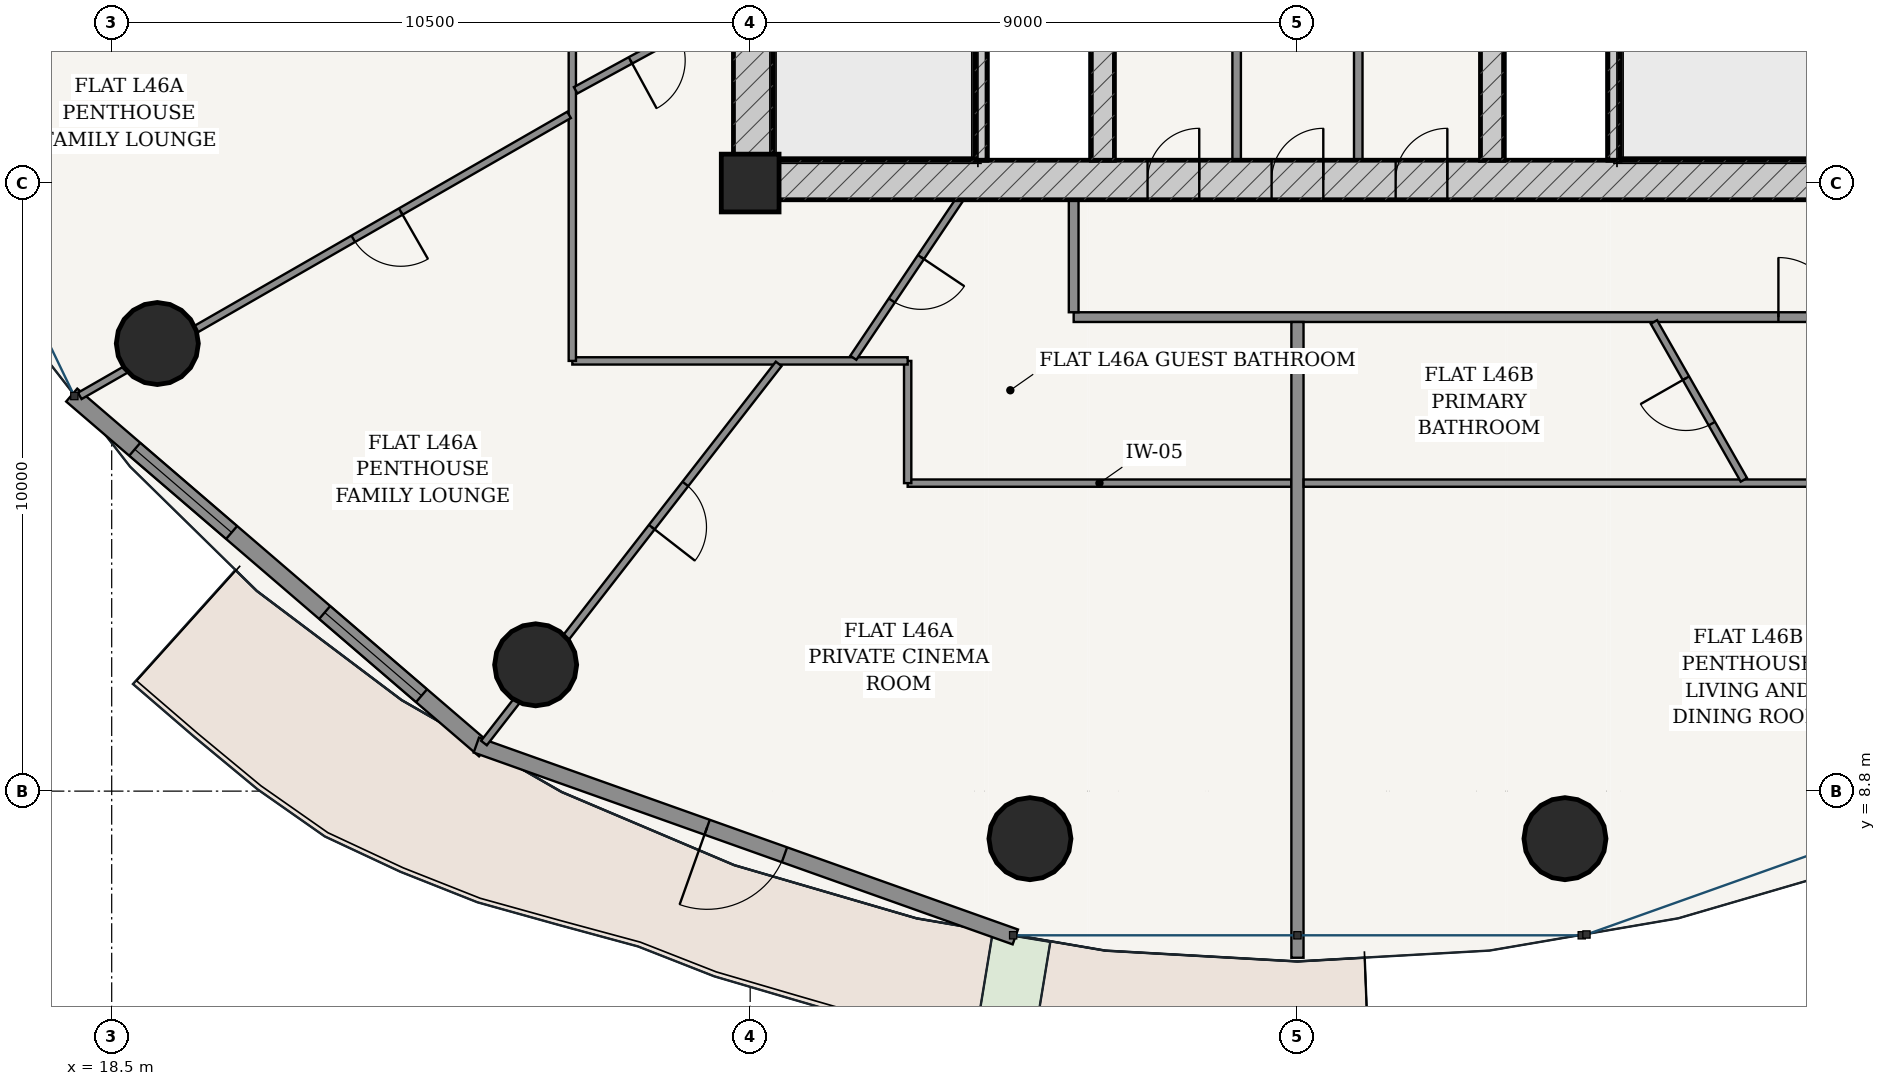
"""IFC4 building model, lengths in metres.
Left out: names, types, materials, properties, quantities, classifications, styles, units other than length and angle.
Written with IfcOpenShell. Run it as: python <this file> out.ifc"""

import sys

from ifc_helpers import new_model, si_unit, direction, frame, frame_2d, origin, origin_2d, place, context, subcontext, project, spatial, rectangle, hollow_circle, extrude, source, transform, mapped, element, fill, save


model = new_model("IFC4")
c1 = context("Model", 3, precision=1e-05, world=origin(), true_north=direction((-0.2419218956, 0.970295726276)))
c2 = subcontext(c1, "Body", "Model", "MODEL_VIEW")
j1 = project(units=[si_unit("LENGTHUNIT", "METRE"), si_unit("PLANEANGLEUNIT", "RADIAN")], contexts=[c1])
p1 = place(None, origin())
s1 = spatial("IfcSite", under=j1, at=p1, CompositionType="ELEMENT")
p2 = place(p1, origin())
s2 = spatial("IfcBuilding", under=s1, at=p2, CompositionType="ELEMENT")
p3 = place(p2, frame((0.0, 0.0, 175.0)))
s3 = spatial("IfcBuildingStorey", under=s2, at=p3, CompositionType="ELEMENT", Elevation=175.0)
p4 = place(p3, frame((29.0, 18.8, 0.0), z_axis=(0.0, 0.0, 1.0), x_axis=(1.0, 0.0, 0.0)))
e1 = element("IfcColumn", 1, at=p4, inside=s3, PredefinedType="COLUMN", context=c2, shape_type="SweptSolid", body=[
    extrude(rectangle(XDim=0.95, YDim=0.95, at=origin_2d()), origin(), (0.0, 0.0, 1.0), 3.6),
])
p5 = place(p3, frame((28.725, 18.85, 0.0), z_axis=(0.0, 0.0, 1.0), x_axis=(1.0, 0.0, 0.0)))
e2 = element("IfcWall", 2, at=p5, inside=s3, PredefinedType="SHEAR", context=c2, shape_type="SweptSolid", body=[
    extrude(rectangle(XDim=18.55, YDim=0.65, at=frame_2d((9.275, 0.0))), origin(), (0.0, 0.0, 1.0), 3.33),
])
p6 = place(p5, frame((6.81, 0.0, 0.0)))
e3 = element("IfcOpeningElement", 3, at=p6, cuts=e2, PredefinedType="OPENING", context=c2, shape_type="SweptSolid", body=[
    extrude(rectangle(XDim=0.85, YDim=2.1, at=frame_2d((0.425, 1.05))), frame((0.0, 0.335, 0.0), z_axis=(0.0, -1.0, 0.0), x_axis=(1.0, 0.0, 0.0)), (0.0, 0.0, 1.0), 0.67),
])
p7 = place(p5, frame((8.85, 0.0, 0.0)))
e4 = element("IfcOpeningElement", 4, at=p7, cuts=e2, PredefinedType="OPENING", context=c2, shape_type="SweptSolid", body=[
    extrude(rectangle(XDim=0.85, YDim=2.1, at=frame_2d((0.425, 1.05))), frame((0.0, 0.335, 0.0), z_axis=(0.0, -1.0, 0.0), x_axis=(1.0, 0.0, 0.0)), (0.0, 0.0, 1.0), 0.67),
])
p8 = place(p5, frame((10.89, 0.0, 0.0)))
e5 = element("IfcOpeningElement", 5, at=p8, cuts=e2, PredefinedType="OPENING", context=c2, shape_type="SweptSolid", body=[
    extrude(rectangle(XDim=0.85, YDim=2.1, at=frame_2d((0.425, 1.05))), frame((0.0, 0.335, 0.0), z_axis=(0.0, -1.0, 0.0), x_axis=(1.0, 0.0, 0.0)), (0.0, 0.0, 1.0), 0.67),
])
p9 = place(p3, frame((29.05, 19.175, 0.0), z_axis=(0.0, 0.0, 1.0), x_axis=(0.0, 1.0, 0.0)))
e6 = element("IfcWall", 6, at=p9, inside=s3, PredefinedType="SHEAR", context=c2, shape_type="SweptSolid", body=[
    extrude(rectangle(XDim=15.25, YDim=0.65, at=frame_2d((7.625, 0.0))), origin(), (0.0, 0.0, 1.0), 3.33),
])
p10 = place(p9, frame((9.875, 0.0, 0.0)))
e7 = element("IfcOpeningElement", 7, at=p10, cuts=e6, PredefinedType="OPENING", context=c2, shape_type="SweptSolid", body=[
    extrude(rectangle(XDim=1.5, YDim=2.2, at=frame_2d((0.75, 1.1))), frame((0.0, 0.335, 0.0), z_axis=(0.0, -1.0, 0.0), x_axis=(1.0, 0.0, 0.0)), (0.0, 0.0, 1.0), 0.67),
])
for number, where, z_axis, x_axis in (
    (8, (32.795, 19.175, 0.0), (0.0, 0.0, 1.0), (0.0, 1.0, 0.0)),
    (9, (43.205, 19.175, 0.0), (0.0, 0.0, 1.0), (0.0, 1.0, 0.0)),
):
    element("IfcWall", number, at=place(p3, frame(where, z_axis=z_axis, x_axis=x_axis)), inside=s3, PredefinedType="SOLIDWALL", context=c2, shape_type="SweptSolid", body=[
        extrude(rectangle(XDim=7.375, YDim=0.2, at=frame_2d((3.688, 0.0))), origin(), (0.0, 0.0, 1.0), 3.33),
    ])
p11 = place(p3, frame((34.8, 19.175, 0.0), z_axis=(0.0, 0.0, 1.0), x_axis=(0.0, 1.0, 0.0)))
e10 = element("IfcWall", 10, at=p11, inside=s3, PredefinedType="SHEAR", context=c2, shape_type="SweptSolid", body=[
    extrude(rectangle(XDim=15.25, YDim=0.38, at=frame_2d((7.625, 0.0))), origin(), (0.0, 0.0, 1.0), 3.33),
])
p12 = place(p11, frame((7.8, 0.0, 0.0)))
e11 = element("IfcOpeningElement", 11, at=p12, cuts=e10, PredefinedType="OPENING", context=c2, shape_type="SweptSolid", body=[
    extrude(rectangle(XDim=1.05, YDim=2.15, at=frame_2d((0.525, 1.075))), frame((0.0, 0.2, 0.0), z_axis=(0.0, -1.0, 0.0), x_axis=(1.0, 0.0, 0.0)), (0.0, 0.0, 1.0), 0.4),
])
p13 = place(p3, frame((41.2, 19.175, 0.0), z_axis=(0.0, 0.0, 1.0), x_axis=(0.0, 1.0, 0.0)))
e12 = element("IfcWall", 12, at=p13, inside=s3, PredefinedType="SHEAR", context=c2, shape_type="SweptSolid", body=[
    extrude(rectangle(XDim=15.25, YDim=0.38, at=frame_2d((7.625, 0.0))), origin(), (0.0, 0.0, 1.0), 3.33),
])
p14 = place(p13, frame((7.8, 0.0, 0.0)))
e13 = element("IfcOpeningElement", 13, at=p14, cuts=e12, PredefinedType="OPENING", context=c2, shape_type="SweptSolid", body=[
    extrude(rectangle(XDim=1.05, YDim=2.15, at=frame_2d((0.525, 1.075))), frame((0.0, 0.2, 0.0), z_axis=(0.0, -1.0, 0.0), x_axis=(1.0, 0.0, 0.0)), (0.0, 0.0, 1.0), 0.4),
])
for number, where, z_axis, x_axis in (
    (14, (19.25, 16.161, 0.0), (0.0, 0.0, 1.0), (1.0, 0.0, 0.0)),
    (15, (25.472, 10.877, 0.0), (0.0, 0.0, 1.0), (1.0, 0.0, 0.0)),
    (16, (33.601, 8.018, 0.0), (0.0, 0.0, 1.0), (1.0, 0.0, 0.0)),
    (17, (42.399, 8.018, 0.0), (0.0, 0.0, 1.0), (1.0, 0.0, 0.0)),
):
    element("IfcColumn", number, at=place(p3, frame(where, z_axis=z_axis, x_axis=x_axis)), inside=s3, PredefinedType="COLUMN", context=c2, shape_type="SweptSolid", body=[
        extrude(hollow_circle(Radius=0.675, WallThickness=0.042, at=origin_2d()), origin(), (0.0, 0.0, 1.0), 3.6),
    ])
p15 = place(p3, frame((17.843, 15.313, 0.0), z_axis=(0.0, 0.0, 1.0), x_axis=(0.75843401647, -0.651749831348, 0.0)))
e18 = element("IfcWall", 18, at=p15, inside=s3, PredefinedType="SOLIDWALL", context=c2, shape_type="SweptSolid", body=[
    extrude(rectangle(XDim=8.952, YDim=0.28, at=frame_2d((4.476, 0.0))), origin(), (0.0, 0.0, 1.0), 3.33),
])
p16 = place(p15, frame((1.367, 0.0, 0.85)))
e19 = element("IfcOpeningElement", 19, at=p16, cuts=e18, PredefinedType="OPENING", context=c2, shape_type="SweptSolid", body=[
    extrude(rectangle(XDim=2.1, YDim=1.95, at=frame_2d((1.05, 0.975))), frame((0.0, 0.15, 0.0), z_axis=(0.0, -1.0, 0.0), x_axis=(1.0, 0.0, 0.0)), (0.0, 0.0, 1.0), 0.3),
])
p17 = place(p15, frame((5.485, 0.0, 0.85)))
e20 = element("IfcOpeningElement", 20, at=p17, cuts=e18, PredefinedType="OPENING", context=c2, shape_type="SweptSolid", body=[
    extrude(rectangle(XDim=2.1, YDim=1.95, at=frame_2d((1.05, 0.975))), frame((0.0, 0.15, 0.0), z_axis=(0.0, -1.0, 0.0), x_axis=(1.0, 0.0, 0.0)), (0.0, 0.0, 1.0), 0.3),
])
p18 = place(p3, frame((24.497, 9.557, 0.0), z_axis=(0.0, 0.0, 1.0), x_axis=(0.942103604331, -0.335321932934, 0.0)))
e21 = element("IfcWall", 21, at=p18, inside=s3, PredefinedType="SOLIDWALL", context=c2, shape_type="SweptSolid", body=[
    extrude(rectangle(XDim=9.408, YDim=0.26, at=frame_2d((4.704, 0.0))), origin(), (0.0, 0.0, 1.0), 3.33),
])
p19 = place(p18, frame((4.029, 0.0, 0.0)))
e22 = element("IfcOpeningElement", 22, at=p19, cuts=e21, PredefinedType="OPENING", context=c2, shape_type="SweptSolid", body=[
    extrude(rectangle(XDim=1.35, YDim=2.2, at=frame_2d((0.675, 1.1))), frame((0.0, 0.14, 0.0), z_axis=(0.0, -1.0, 0.0), x_axis=(1.0, 0.0, 0.0)), (0.0, 0.0, 1.0), 0.28),
])
p20 = place(p3, frame((37.0, 19.175, 0.0), z_axis=(0.0, 0.0, 1.0), x_axis=(0.0, 1.0, 0.0)))
e23 = element("IfcWall", 23, at=p20, inside=s3, PredefinedType="PARTITIONING", context=c2, shape_type="SweptSolid", body=[
    extrude(rectangle(XDim=4.465, YDim=0.14, at=frame_2d((2.232, 0.0))), origin(), (0.0, 0.0, 1.0), 3.33),
])
p21 = place(p20, frame((1.808, 0.0, 0.0)))
e24 = element("IfcOpeningElement", 24, at=p21, cuts=e23, PredefinedType="OPENING", context=c2, shape_type="SweptSolid", body=[
    extrude(rectangle(XDim=0.85, YDim=2.1, at=frame_2d((0.425, 1.05))), frame((0.0, 0.08, 0.0), z_axis=(0.0, -1.0, 0.0), x_axis=(1.0, 0.0, 0.0)), (0.0, 0.0, 1.0), 0.16),
])
p22 = place(p3, frame((39.0, 19.175, 0.0), z_axis=(0.0, 0.0, 1.0), x_axis=(0.0, 1.0, 0.0)))
e25 = element("IfcWall", 25, at=p22, inside=s3, PredefinedType="PARTITIONING", context=c2, shape_type="SweptSolid", body=[
    extrude(rectangle(XDim=4.465, YDim=0.14, at=frame_2d((2.232, 0.0))), origin(), (0.0, 0.0, 1.0), 3.33),
])
p23 = place(p22, frame((1.808, 0.0, 0.0)))
e26 = element("IfcOpeningElement", 26, at=p23, cuts=e25, PredefinedType="OPENING", context=c2, shape_type="SweptSolid", body=[
    extrude(rectangle(XDim=0.85, YDim=2.1, at=frame_2d((0.425, 1.05))), frame((0.0, 0.08, 0.0), z_axis=(0.0, -1.0, 0.0), x_axis=(1.0, 0.0, 0.0)), (0.0, 0.0, 1.0), 0.16),
])
p24 = place(p3, frame((34.32, 16.595, 0.0), z_axis=(0.0, 0.0, 1.0), x_axis=(1.0, 0.0, 0.0)))
e27 = element("IfcWall", 27, at=p24, inside=s3, PredefinedType="PARTITIONING", context=c2, shape_type="SweptSolid", body=[
    extrude(rectangle(XDim=14.885, YDim=0.16, at=frame_2d((7.442, 0.0))), origin(), (0.0, 0.0, 1.0), 2.776),
])
p25 = place(p24, frame((11.59, 0.0, 0.0)))
e28 = element("IfcOpeningElement", 28, at=p25, cuts=e27, PredefinedType="OPENING", context=c2, shape_type="SweptSolid", body=[
    extrude(rectangle(XDim=0.98, YDim=2.2, at=frame_2d((0.49, 1.1))), frame((0.0, 0.09, 0.0), z_axis=(0.0, -1.0, 0.0), x_axis=(1.0, 0.0, 0.0)), (0.0, 0.0, 1.0), 0.18),
])
p26 = place(p3, frame((34.32, 16.675, 0.0), z_axis=(0.0, 0.0, 1.0), x_axis=(0.0, 1.0, 0.0)))
e29 = element("IfcWall", 29, at=p26, inside=s3, PredefinedType="PARTITIONING", context=c2, shape_type="SweptSolid", body=[
    extrude(rectangle(XDim=1.85, YDim=0.16, at=frame_2d((0.925, 0.0))), origin(), (0.0, 0.0, 1.0), 3.33),
])
p27 = place(p3, frame((37.898, 13.865, 0.0), z_axis=(0.0, 0.0, 1.0), x_axis=(-1.0, 0.0, 0.0)))
e30 = element("IfcWall", 30, at=p27, inside=s3, PredefinedType="PARTITIONING", context=c2, shape_type="SweptSolid", body=[
    extrude(rectangle(XDim=6.308, YDim=0.12, at=frame_2d((3.154, 0.0))), origin(), (0.0, 0.0, 1.0), 2.776),
])
p28 = place(p3, frame((31.59, 13.865, 0.0), z_axis=(0.0, 0.0, 1.0), x_axis=(0.0, 1.0, 0.0)))
e31 = element("IfcWall", 31, at=p28, inside=s3, PredefinedType="PARTITIONING", context=c2, shape_type="SweptSolid", body=[
    extrude(rectangle(XDim=2.01, YDim=0.12, at=frame_2d((1.005, 0.0))), origin(), (0.0, 0.0, 1.0), 3.005),
])
p29 = place(p3, frame((31.59, 15.875, 0.0), z_axis=(0.0, 0.0, 1.0), x_axis=(-1.0, 0.0, 0.0)))
e32 = element("IfcWall", 32, at=p29, inside=s3, PredefinedType="PARTITIONING", context=c2, shape_type="SweptSolid", body=[
    extrude(rectangle(XDim=5.515, YDim=0.12, at=frame_2d((2.758, 0.0))), origin(), (0.0, 0.0, 1.0), 2.776),
])
p30 = place(p3, frame((26.075, 15.875, 0.0), z_axis=(0.0, 0.0, 1.0), x_axis=(0.0, 1.0, 0.0)))
e33 = element("IfcWall", 33, at=p30, inside=s3, PredefinedType="PARTITIONING", context=c2, shape_type="SweptSolid", body=[
    extrude(rectangle(XDim=5.715, YDim=0.12, at=frame_2d((2.857, 0.0))), origin(), (0.0, 0.0, 1.0), 2.776),
])
p31 = place(p3, frame((26.021, 19.921, 0.0), z_axis=(0.0, 0.0, 1.0), x_axis=(-0.867161148693, -0.498027652041, 0.0)))
e34 = element("IfcWall", 34, at=p31, inside=s3, PredefinedType="PARTITIONING", context=c2, shape_type="SweptSolid", body=[
    extrude(rectangle(XDim=9.279, YDim=0.12, at=frame_2d((4.64, 0.0))), origin(), (0.0, 0.0, 1.0), 2.776),
])
p32 = place(p31, frame((3.192, 0.0, 0.0)))
e35 = element("IfcOpeningElement", 35, at=p32, cuts=e34, PredefinedType="OPENING", context=c2, shape_type="SweptSolid", body=[
    extrude(rectangle(XDim=0.9, YDim=2.15, at=frame_2d((0.45, 1.075))), frame((0.0, 0.07, 0.0), z_axis=(0.0, -1.0, 0.0), x_axis=(1.0, 0.0, 0.0)), (0.0, 0.0, 1.0), 0.14),
])
p33 = place(p3, frame((29.469, 15.826, 0.0), z_axis=(0.0, 0.0, 1.0), x_axis=(-0.61373942367, -0.789508657225, 0.0)))
e36 = element("IfcWall", 36, at=p33, inside=s3, PredefinedType="PARTITIONING", context=c2, shape_type="SweptSolid", body=[
    extrude(rectangle(XDim=7.898, YDim=0.12, at=frame_2d((3.949, 0.0))), origin(), (0.0, 0.0, 1.0), 2.776),
])
p34 = place(p33, frame((2.5, 0.0, 0.0)))
e37 = element("IfcOpeningElement", 37, at=p34, cuts=e36, PredefinedType="OPENING", context=c2, shape_type="SweptSolid", body=[
    extrude(rectangle(XDim=0.9, YDim=2.15, at=frame_2d((0.45, 1.075))), frame((0.0, 0.07, 0.0), z_axis=(0.0, -1.0, 0.0), x_axis=(1.0, 0.0, 0.0)), (0.0, 0.0, 1.0), 0.14),
])
p35 = place(p3, frame((28.723, 21.74, 0.0), z_axis=(0.0, 0.0, 1.0), x_axis=(-0.877892414948, -0.47885792024, 0.0)))
e38 = element("IfcWall", 38, at=p35, inside=s3, PredefinedType="PARTITIONING", context=c2, shape_type="SweptSolid", body=[
    extrude(rectangle(XDim=2.955, YDim=0.12, at=frame_2d((1.477, 0.0))), origin(), (0.0, 0.0, 1.0), 3.33),
])
p36 = place(p35, frame((1.027, 0.0, 0.0)))
e39 = element("IfcOpeningElement", 39, at=p36, cuts=e38, PredefinedType="OPENING", context=c2, shape_type="SweptSolid", body=[
    extrude(rectangle(XDim=0.9, YDim=2.15, at=frame_2d((0.45, 1.075))), frame((0.0, 0.07, 0.0), z_axis=(0.0, -1.0, 0.0), x_axis=(1.0, 0.0, 0.0)), (0.0, 0.0, 1.0), 0.14),
])
p37 = place(p3, frame((32.441, 18.525, 0.0), z_axis=(0.0, 0.0, 1.0), x_axis=(-0.557594690071, -0.830113342625, 0.0)))
e40 = element("IfcWall", 40, at=p37, inside=s3, PredefinedType="PARTITIONING", context=c2, shape_type="SweptSolid", body=[
    extrude(rectangle(XDim=3.13, YDim=0.12, at=frame_2d((1.565, 0.0))), origin(), (0.0, 0.0, 1.0), 3.33),
])
p38 = place(p37, frame((1.135, 0.0, 0.0)))
e41 = element("IfcOpeningElement", 41, at=p38, cuts=e40, PredefinedType="OPENING", context=c2, shape_type="SweptSolid", body=[
    extrude(rectangle(XDim=0.86, YDim=2.15, at=frame_2d((0.43, 1.075))), frame((0.0, 0.07, 0.0), z_axis=(0.0, -1.0, 0.0), x_axis=(1.0, 0.0, 0.0)), (0.0, 0.0, 1.0), 0.14),
])
p39 = place(p3, frame((38.0, 16.515, 0.0), z_axis=(0.0, 0.0, 1.0), x_axis=(0.0, -1.0, 0.0)))
e42 = element("IfcWall", 42, at=p39, inside=s3, PredefinedType="PARTITIONING", context=c2, shape_type="SweptSolid", body=[
    extrude(rectangle(XDim=10.455, YDim=0.2, at=frame_2d((5.228, 0.0))), origin(), (0.0, 0.0, 1.0), 2.846),
])
p40 = place(p3, frame((51.935, 13.865, 0.0), z_axis=(0.0, 0.0, 1.0), x_axis=(-1.0, 0.0, 0.0)))
e43 = element("IfcWall", 43, at=p40, inside=s3, PredefinedType="PARTITIONING", context=c2, shape_type="SweptSolid", body=[
    extrude(rectangle(XDim=13.833, YDim=0.12, at=frame_2d((6.917, 0.0))), origin(), (0.0, 0.0, 1.0), 2.776),
])
p41 = place(p40, frame((3.009, 0.0, 0.0)))
e44 = element("IfcOpeningElement", 44, at=p41, cuts=e43, PredefinedType="OPENING", context=c2, shape_type="SweptSolid", body=[
    extrude(rectangle(XDim=0.9, YDim=2.15, at=frame_2d((0.45, 1.075))), frame((0.0, 0.07, 0.0), z_axis=(0.0, -1.0, 0.0), x_axis=(1.0, 0.0, 0.0)), (0.0, 0.0, 1.0), 0.14),
])
p42 = place(p3, frame((43.862, 16.515, 0.0), z_axis=(0.0, 0.0, 1.0), x_axis=(0.495214761056, -0.868770591372, 0.0)))
e45 = element("IfcWall", 45, at=p42, inside=s3, PredefinedType="PARTITIONING", context=c2, shape_type="SweptSolid", body=[
    extrude(rectangle(XDim=2.988, YDim=0.12, at=frame_2d((1.494, 0.0))), origin(), (0.0, 0.0, 1.0), 3.005),
])
p43 = place(p42, frame((1.064, 0.0, 0.0)))
e46 = element("IfcOpeningElement", 46, at=p43, cuts=e45, PredefinedType="OPENING", context=c2, shape_type="SweptSolid", body=[
    extrude(rectangle(XDim=0.86, YDim=2.15, at=frame_2d((0.43, 1.075))), frame((0.0, 0.07, 0.0), z_axis=(0.0, -1.0, 0.0), x_axis=(1.0, 0.0, 0.0)), (0.0, 0.0, 1.0), 0.14),
])
m1 = source(origin(), c2, "Body", "SweptSolid", [
    extrude(rectangle(XDim=2.1, YDim=1.95, at=frame_2d((1.05, 0.975))), frame((0.0, 0.03, 0.0), z_axis=(0.0, -1.0, 0.0), x_axis=(1.0, 0.0, 0.0)), (0.0, 0.0, 1.0), 0.06),
])
p44 = place(p16, origin())
e47 = element("IfcWindow", 47, at=p44, inside=s3, PartitioningType="SINGLE_PANEL", PredefinedType="WINDOW", context=c2, shape_type="MappedRepresentation", body=[
    mapped(m1, transform((0.0, 0.0, 0.0), scale=1.0)),
])
fill(e19, e47)
p45 = place(p17, origin())
e48 = element("IfcWindow", 48, at=p45, inside=s3, PartitioningType="SINGLE_PANEL", PredefinedType="WINDOW", context=c2, shape_type="MappedRepresentation", body=[
    mapped(m1, transform((0.0, 0.0, 0.0), scale=1.0)),
])
fill(e20, e48)
m2 = source(origin(), c2, "Body", "SweptSolid", [
    extrude(rectangle(XDim=1.35, YDim=2.2, at=frame_2d((0.675, 1.1))), frame((0.0, 0.025, 0.0), z_axis=(0.0, -1.0, 0.0), x_axis=(1.0, 0.0, 0.0)), (0.0, 0.0, 1.0), 0.05),
])
p46 = place(p19, frame((1.35, 0.0, 0.0), z_axis=(0.0, 0.0, 1.0), x_axis=(-1.0, 0.0, 0.0)))
e49 = element("IfcDoor", 49, at=p46, inside=s3, OperationType="SINGLE_SWING_RIGHT", PredefinedType="DOOR", context=c2, shape_type="MappedRepresentation", body=[
    mapped(m2, transform((0.0, 0.0, 0.0), scale=1.0)),
])
fill(e22, e49)
m3 = source(origin(), c2, "Body", "SweptSolid", [
    extrude(rectangle(XDim=0.85, YDim=2.1, at=frame_2d((0.425, 1.05))), frame((0.0, 0.025, 0.0), z_axis=(0.0, -1.0, 0.0), x_axis=(1.0, 0.0, 0.0)), (0.0, 0.0, 1.0), 0.05),
])
p47 = place(p6, origin())
e50 = element("IfcDoor", 50, at=p47, inside=s3, OperationType="SINGLE_SWING_RIGHT", PredefinedType="DOOR", context=c2, shape_type="MappedRepresentation", body=[
    mapped(m3, transform((0.0, 0.0, 0.0), scale=1.0)),
])
fill(e3, e50)
p48 = place(p7, origin())
e51 = element("IfcDoor", 51, at=p48, inside=s3, OperationType="SINGLE_SWING_RIGHT", PredefinedType="DOOR", context=c2, shape_type="MappedRepresentation", body=[
    mapped(m3, transform((0.0, 0.0, 0.0), scale=1.0)),
])
fill(e4, e51)
p49 = place(p8, origin())
e52 = element("IfcDoor", 52, at=p49, inside=s3, OperationType="SINGLE_SWING_RIGHT", PredefinedType="DOOR", context=c2, shape_type="MappedRepresentation", body=[
    mapped(m3, transform((0.0, 0.0, 0.0), scale=1.0)),
])
fill(e5, e52)
m4 = source(origin(), c2, "Body", "SweptSolid", [
    extrude(rectangle(XDim=0.9, YDim=2.15, at=frame_2d((0.45, 1.075))), frame((0.0, 0.025, 0.0), z_axis=(0.0, -1.0, 0.0), x_axis=(1.0, 0.0, 0.0)), (0.0, 0.0, 1.0), 0.05),
])
p50 = place(p36, origin())
e53 = element("IfcDoor", 53, at=p50, inside=s3, OperationType="SINGLE_SWING_RIGHT", PredefinedType="DOOR", context=c2, shape_type="MappedRepresentation", body=[
    mapped(m4, transform((0.0, 0.0, 0.0), scale=1.0)),
])
fill(e39, e53)
m5 = source(origin(), c2, "Body", "SweptSolid", [
    extrude(rectangle(XDim=0.86, YDim=2.15, at=frame_2d((0.43, 1.075))), frame((0.0, 0.025, 0.0), z_axis=(0.0, -1.0, 0.0), x_axis=(1.0, 0.0, 0.0)), (0.0, 0.0, 1.0), 0.05),
])
p51 = place(p38, origin())
e54 = element("IfcDoor", 54, at=p51, inside=s3, OperationType="SINGLE_SWING_LEFT", PredefinedType="DOOR", context=c2, shape_type="MappedRepresentation", body=[
    mapped(m5, transform((0.0, 0.0, 0.0), scale=1.0)),
])
fill(e41, e54)
p52 = place(p32, origin())
e55 = element("IfcDoor", 55, at=p52, inside=s3, OperationType="SINGLE_SWING_LEFT", PredefinedType="DOOR", context=c2, shape_type="MappedRepresentation", body=[
    mapped(m4, transform((0.0, 0.0, 0.0), scale=1.0)),
])
fill(e35, e55)
p53 = place(p34, origin())
e56 = element("IfcDoor", 56, at=p53, inside=s3, OperationType="SINGLE_SWING_RIGHT", PredefinedType="DOOR", context=c2, shape_type="MappedRepresentation", body=[
    mapped(m4, transform((0.0, 0.0, 0.0), scale=1.0)),
])
fill(e37, e56)
m6 = source(origin(), c2, "Body", "SweptSolid", [
    extrude(rectangle(XDim=0.98, YDim=2.2, at=frame_2d((0.49, 1.1))), frame((0.0, 0.025, 0.0), z_axis=(0.0, -1.0, 0.0), x_axis=(1.0, 0.0, 0.0)), (0.0, 0.0, 1.0), 0.05),
])
p54 = place(p25, origin())
e57 = element("IfcDoor", 57, at=p54, inside=s3, OperationType="SINGLE_SWING_LEFT", PredefinedType="DOOR", context=c2, shape_type="MappedRepresentation", body=[
    mapped(m6, transform((0.0, 0.0, 0.0), scale=1.0)),
])
fill(e28, e57)
p55 = place(p43, frame((0.86, 0.0, 0.0), z_axis=(0.0, 0.0, 1.0), x_axis=(-1.0, 0.0, 0.0)))
e58 = element("IfcDoor", 58, at=p55, inside=s3, OperationType="SINGLE_SWING_RIGHT", PredefinedType="DOOR", context=c2, shape_type="MappedRepresentation", body=[
    mapped(m5, transform((0.0, 0.0, 0.0), scale=1.0)),
])
fill(e46, e58)
save(model, sys.argv[1])
